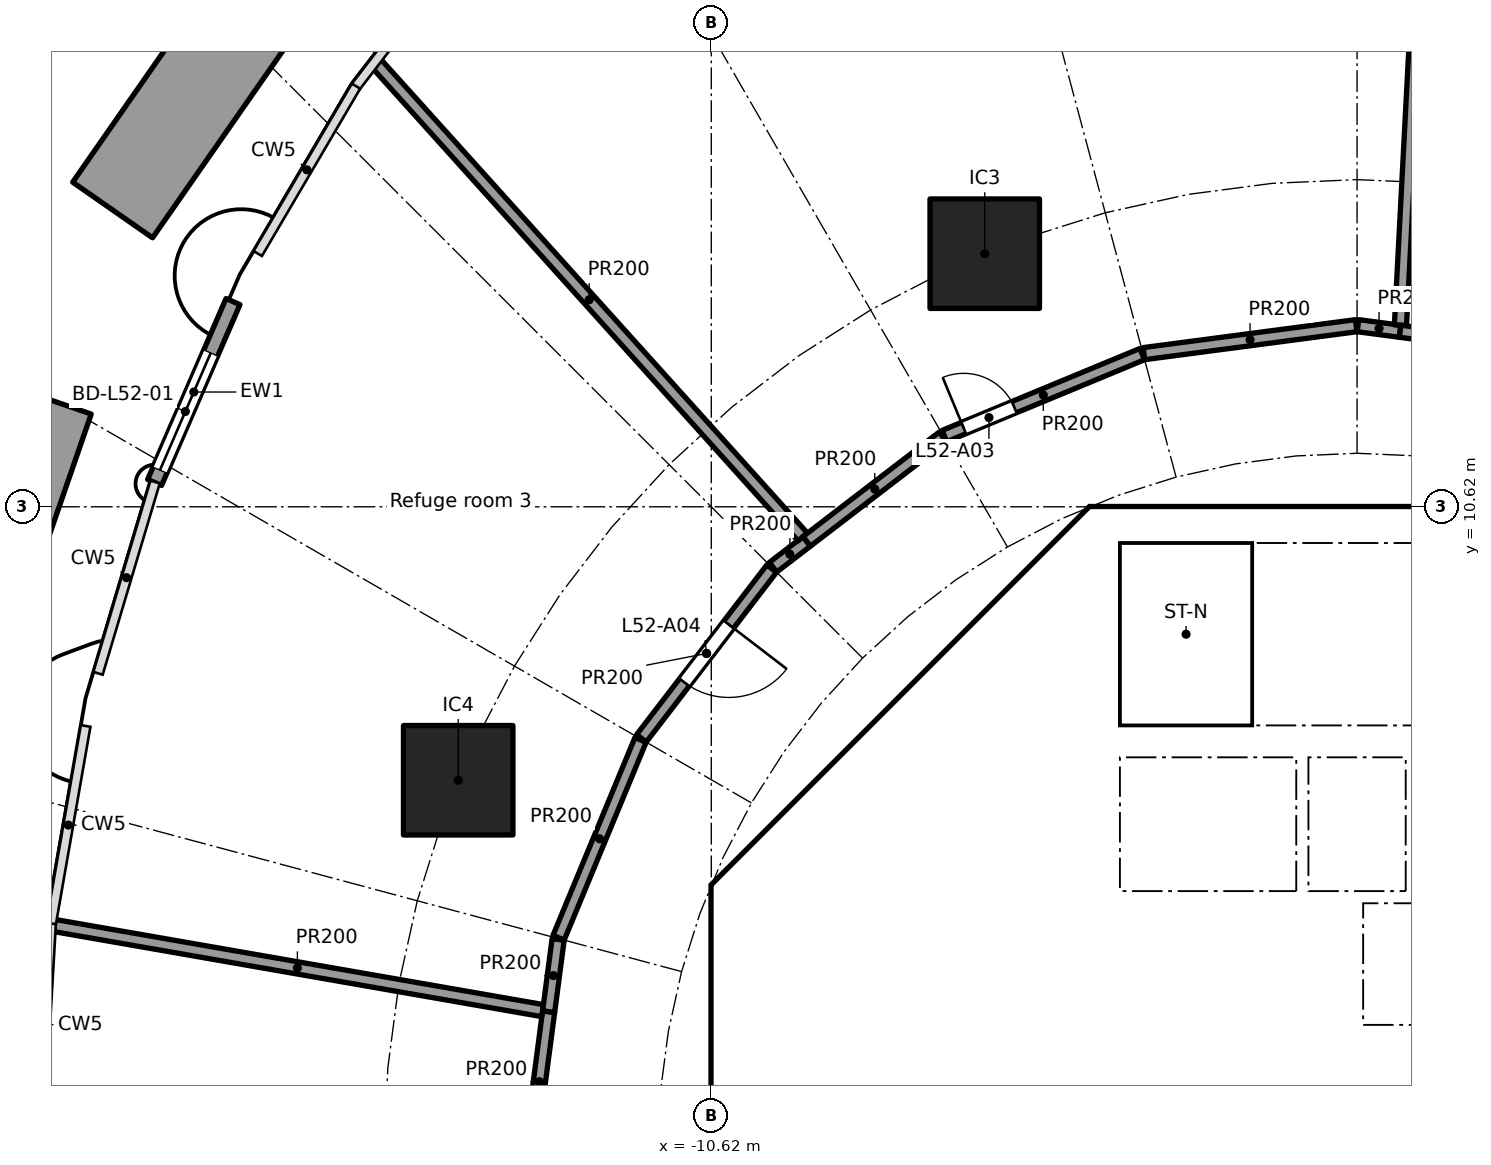
"""IFC4 building model, lengths in metres.
Left out: names, types, materials, properties, quantities, classifications, styles, units other than length and angle.
Written with IfcOpenShell. Run it as: python <this file> out.ifc"""

import sys

from ifc_helpers import new_model, si_unit, direction, frame, frame_2d, origin, origin_2d, place, context, subcontext, project, spatial, polyline, rectangle, outline, extrude, element, fill, save


model = new_model("IFC4")
c1 = context("Model", 3, precision=1e-05, world=origin(), true_north=direction((0.0, 1.0)))
c2 = subcontext(c1, "Body", "Model", "MODEL_VIEW")
j1 = project(units=[si_unit("LENGTHUNIT", "METRE"), si_unit("PLANEANGLEUNIT", "RADIAN")], contexts=[c1])
p1 = place(None, origin())
s1 = spatial("IfcSite", under=j1, at=p1, CompositionType="ELEMENT")
p2 = place(p1, origin())
s2 = spatial("IfcBuilding", under=s1, at=p2, CompositionType="ELEMENT")
p3 = place(p2, frame((0.0, 0.0, 206.6)))
s3 = spatial("IfcBuildingStorey", under=s2, at=p3, CompositionType="ELEMENT", Elevation=206.6)
for number, where, z_axis, x_axis in (
    (1, (-6.123, 14.782, 0.0), (0.0, 0.0, 1.0), (1.0, 0.0, 0.0)),
    (2, (-14.782, 6.123, 0.0), (0.0, 0.0, 1.0), (1.0, 0.0, 0.0)),
):
    element("IfcColumn", number, at=place(p3, frame(where, z_axis=z_axis, x_axis=x_axis)), inside=s3, PredefinedType="COLUMN", context=c2, shape_type="SweptSolid", body=[
        extrude(rectangle(XDim=1.8, YDim=1.8, at=origin_2d()), origin(), (0.0, 0.0, 1.0), 5.6),
    ])
p4 = place(p3, frame((-19.775, 11.02, 0.0), z_axis=(0.0, 0.0, 1.0), x_axis=(0.397624344801, 0.917548298686, 0.0)))
e3 = element("IfcWall", 3, at=p4, inside=s3, PredefinedType="SOLIDWALL", context=c2, shape_type="SweptSolid", body=[
    extrude(rectangle(XDim=3.242, YDim=0.25, at=frame_2d((1.621, 0.0))), origin(), (0.0, 0.0, 1.0), 5.34),
])
p5 = place(p4, frame((0.221, 0.0, 0.0)))
e4 = element("IfcOpeningElement", 4, at=p5, cuts=e3, PredefinedType="OPENING", context=c2, shape_type="SweptSolid", body=[
    extrude(rectangle(XDim=2.1, YDim=2.4, at=frame_2d((1.05, 1.2))), frame((0.0, 0.135, 0.0), z_axis=(0.0, -1.0, 0.0), x_axis=(1.0, 0.0, 0.0)), (0.0, 0.0, 1.0), 0.27),
])
p6 = place(p3, frame((-21.573, 12.406, 0.0), z_axis=(0.0, 0.0, 1.0), x_axis=(-0.326881429712, -0.94506535801, 0.0)))
e5 = element("IfcWall", 5, at=p6, inside=s3, PredefinedType="SOLIDWALL", context=c2, shape_type="SweptSolid", body=[
    extrude(rectangle(XDim=5.05, YDim=1.6, at=frame_2d((2.525, 0.0))), origin(), (0.0, 0.0, 1.0), 1.1),
])
p7 = place(p3, frame((-15.788, 22.215, 0.0), z_axis=(0.0, 0.0, 1.0), x_axis=(-0.571584522967, -0.82054319393, 0.0)))
e6 = element("IfcWall", 6, at=p7, inside=s3, PredefinedType="SOLIDWALL", context=c2, shape_type="SweptSolid", body=[
    extrude(rectangle(XDim=8.183, YDim=1.6, at=frame_2d((4.091, 0.0))), origin(), (0.0, 0.0, 1.0), 1.1),
])
p8 = place(p3, frame((-4.613, 9.988, 0.0), z_axis=(0.0, 0.0, 1.0), x_axis=(-0.707106781187, -0.707106781187, 0.0)))
e7 = element("IfcWall", 7, at=p8, inside=s3, PredefinedType="SHEAR", context=c2, shape_type="SweptSolid", body=[
    extrude(rectangle(XDim=7.602, YDim=0.6, at=frame_2d((3.801, 0.0))), origin(), (0.0, 0.0, 1.0), 5.34),
])
p9 = place(p8, frame((0.351, 0.0, 0.0)))
e8 = element("IfcOpeningElement", 8, at=p9, cuts=e7, PredefinedType="OPENING", context=c2, shape_type="SweptSolid", body=[
    extrude(rectangle(XDim=1.1, YDim=2.1, at=frame_2d((0.55, 1.05))), frame((0.0, 0.31, 0.0), z_axis=(0.0, -1.0, 0.0), x_axis=(1.0, 0.0, 0.0)), (0.0, 0.0, 1.0), 0.62),
])
p10 = place(p3, frame((-10.325, 3.801, 0.0), z_axis=(0.0, 0.0, 1.0), x_axis=(0.0, -1.0, 0.0)))
e9 = element("IfcWall", 9, at=p10, inside=s3, PredefinedType="SHEAR", context=c2, shape_type="SweptSolid", body=[
    extrude(rectangle(XDim=7.602, YDim=0.6, at=frame_2d((3.801, 0.0))), origin(), (0.0, 0.0, 1.0), 5.34),
])
p11 = place(p10, frame((0.651, 0.0, 0.0)))
e10 = element("IfcOpeningElement", 10, at=p11, cuts=e9, PredefinedType="OPENING", context=c2, shape_type="SweptSolid", body=[
    extrude(rectangle(XDim=1.5, YDim=2.1, at=frame_2d((0.75, 1.05))), frame((0.0, 0.31, 0.0), z_axis=(0.0, -1.0, 0.0), x_axis=(1.0, 0.0, 0.0)), (0.0, 0.0, 1.0), 0.62),
])
p12 = place(p10, frame((5.451, 0.0, 0.0)))
e11 = element("IfcOpeningElement", 11, at=p12, cuts=e9, PredefinedType="OPENING", context=c2, shape_type="SweptSolid", body=[
    extrude(rectangle(XDim=1.5, YDim=2.1, at=frame_2d((0.75, 1.05))), frame((0.0, 0.31, 0.0), z_axis=(0.0, -1.0, 0.0), x_axis=(1.0, 0.0, 0.0)), (0.0, 0.0, 1.0), 0.62),
])
p13 = place(p3, frame((-5.8, 4.3, 0.0), z_axis=(0.0, 0.0, 1.0), x_axis=(0.0, 1.0, 0.0)))
e12 = element("IfcWall", 12, at=p13, inside=s3, PredefinedType="PARTITIONING", context=c2, shape_type="SweptSolid", body=[
    extrude(rectangle(XDim=3.927, YDim=0.15, at=frame_2d((1.963, 0.0))), origin(), (0.0, 0.0, 1.0), 5.34),
])
p14 = place(p13, frame((1.551, 0.0, 0.0)))
e13 = element("IfcOpeningElement", 13, at=p14, cuts=e12, PredefinedType="OPENING", context=c2, shape_type="SweptSolid", body=[
    extrude(rectangle(XDim=0.9, YDim=2.1, at=frame_2d((0.45, 1.05))), frame((0.0, 0.085, 0.0), z_axis=(0.0, -1.0, 0.0), x_axis=(1.0, 0.0, 0.0)), (0.0, 0.0, 1.0), 0.17),
])
p15 = place(p3, frame((-4.0, 4.3, 0.0), z_axis=(0.0, 0.0, 1.0), x_axis=(0.0, 1.0, 0.0)))
e14 = element("IfcWall", 14, at=p15, inside=s3, PredefinedType="SOLIDWALL", context=c2, shape_type="SweptSolid", body=[
    extrude(rectangle(XDim=2.2, YDim=0.2, at=frame_2d((1.1, 0.0))), origin(), (0.0, 0.0, 1.0), 5.34),
])
p16 = place(p15, frame((0.55, 0.0, 0.0)))
e15 = element("IfcOpeningElement", 15, at=p16, cuts=e14, PredefinedType="OPENING", context=c2, shape_type="SweptSolid", body=[
    extrude(rectangle(XDim=1.1, YDim=2.1, at=frame_2d((0.55, 1.05))), frame((0.0, 0.11, 0.0), z_axis=(0.0, -1.0, 0.0), x_axis=(1.0, 0.0, 0.0)), (0.0, 0.0, 1.0), 0.22),
])
p17 = place(p3, frame((-6.7, 2.0, 0.0), z_axis=(0.0, 0.0, 1.0), x_axis=(1.0, 0.0, 0.0)))
e16 = element("IfcWall", 16, at=p17, inside=s3, PredefinedType="SOLIDWALL", context=c2, shape_type="SweptSolid", body=[
    extrude(rectangle(XDim=13.4, YDim=0.2, at=frame_2d((6.7, 0.0))), origin(), (0.0, 0.0, 1.0), 5.34),
])
p18 = place(p17, frame((7.25, 0.0, 0.0)))
e17 = element("IfcOpeningElement", 17, at=p18, cuts=e16, PredefinedType="OPENING", context=c2, shape_type="SweptSolid", body=[
    extrude(rectangle(XDim=1.1, YDim=2.1, at=frame_2d((0.55, 1.05))), frame((0.0, 0.11, 0.0), z_axis=(0.0, -1.0, 0.0), x_axis=(1.0, 0.0, 0.0)), (0.0, 0.0, 1.0), 0.22),
])
p19 = place(p17, frame((9.45, 0.0, 0.0)))
e18 = element("IfcOpeningElement", 18, at=p19, cuts=e16, PredefinedType="OPENING", context=c2, shape_type="SweptSolid", body=[
    extrude(rectangle(XDim=1.1, YDim=2.1, at=frame_2d((0.55, 1.05))), frame((0.0, 0.11, 0.0), z_axis=(0.0, -1.0, 0.0), x_axis=(1.0, 0.0, 0.0)), (0.0, 0.0, 1.0), 0.22),
])
p20 = place(p17, frame((0.75, 0.0, 0.0)))
e19 = element("IfcOpeningElement", 19, at=p20, cuts=e16, PredefinedType="OPENING", context=c2, shape_type="SweptSolid", body=[
    extrude(rectangle(XDim=0.9, YDim=2.1, at=frame_2d((0.45, 1.05))), frame((0.0, 0.11, 0.0), z_axis=(0.0, -1.0, 0.0), x_axis=(1.0, 0.0, 0.0)), (0.0, 0.0, 1.0), 0.22),
])
p21 = place(p17, frame((4.05, 0.0, 0.0)))
e20 = element("IfcOpeningElement", 20, at=p21, cuts=e16, PredefinedType="OPENING", context=c2, shape_type="SweptSolid", body=[
    extrude(rectangle(XDim=0.9, YDim=2.1, at=frame_2d((0.45, 1.05))), frame((0.0, 0.11, 0.0), z_axis=(0.0, -1.0, 0.0), x_axis=(1.0, 0.0, 0.0)), (0.0, 0.0, 1.0), 0.22),
])
p22 = place(p3, origin())
e21 = element("IfcWall", 21, at=p22, inside=s3, PredefinedType="SHEAR", context=c2, shape_type="SweptSolid", body=[
    extrude(outline(polyline([(-10.2, 4.825), (-9.776, 4.401), (-10.025, 4.152), (-10.025, 3.801), (-10.625, 3.801), (-10.625, 4.401), (-10.2, 4.825)])), origin(), (0.0, 0.0, 1.0), 5.34),
])
p23 = place(p3, origin())
e22 = element("IfcWall", 22, at=p23, inside=s3, PredefinedType="SHEAR", context=c2, shape_type="SweptSolid", body=[
    extrude(outline(polyline([(-4.152, 10.025), (-4.401, 9.776), (-4.825, 10.2), (-4.401, 10.625), (4.401, 10.625), (4.825, 10.2), (4.401, 9.776), (4.152, 10.025), (-4.152, 10.025)])), origin(), (0.0, 0.0, 1.0), 5.34),
])
for number, where, z_axis, x_axis in (
    (23, (-0.9, 4.3, 0.0), (0.0, 0.0, 1.0), (0.0, 1.0, 0.0)),
    (24, (0.9, 4.3, 0.0), (0.0, 0.0, 1.0), (0.0, 1.0, 0.0)),
):
    element("IfcWall", number, at=place(p3, frame(where, z_axis=z_axis, x_axis=x_axis)), inside=s3, PredefinedType="SOLIDWALL", context=c2, shape_type="SweptSolid", body=[
        extrude(rectangle(XDim=2.2, YDim=0.2, at=frame_2d((1.1, 0.0))), origin(), (0.0, 0.0, 1.0), 5.34),
    ])
p24 = place(p3, origin())
e25 = element("IfcWall", 25, at=p24, inside=s3, PredefinedType="SOLIDWALL", context=c2, shape_type="SweptSolid", body=[
    extrude(outline(polyline([(-6.7, 4.3), (6.7, 4.3), (6.7, 2.1), (6.5, 2.1), (6.5, 4.1), (4.5, 4.1), (4.5, 2.1), (4.3, 2.1), (4.3, 4.1), (2.3, 4.1), (2.3, 2.1), (2.1, 2.1), (2.1, 4.1), (0.1, 4.1), (0.1, 2.1), (-0.1, 2.1), (-0.1, 4.1), (-4.3, 4.1), (-4.3, 2.1), (-4.5, 2.1), (-4.5, 4.1), (-6.5, 4.1), (-6.5, 2.1), (-6.7, 2.1), (-6.7, 4.3)])), origin(), (0.0, 0.0, 1.0), 5.34),
])
p25 = place(p3, frame((-10.025, 4.0, 0.0), z_axis=(0.0, 0.0, 1.0), x_axis=(1.0, 0.0, 0.0)))
e26 = element("IfcWall", 26, at=p25, inside=s3, PredefinedType="PARTITIONING", context=c2, shape_type="SweptSolid", body=[
    extrude(rectangle(XDim=3.325, YDim=0.2, at=frame_2d((1.662, 0.0))), origin(), (0.0, 0.0, 1.0), 5.34),
])
p26 = place(p3, origin())
e27 = element("IfcWall", 27, at=p26, inside=s3, PredefinedType="SOLIDWALL", context=c2, shape_type="SweptSolid", body=[
    extrude(outline(polyline([(-3.9, 7.025), (-4.1, 7.025), (-4.1, 10.025), (-3.9, 10.025), (-3.9, 7.025)])), origin(), (0.0, 0.0, 1.0), 5.34),
])
p27 = place(p3, origin())
e28 = element("IfcWall", 28, at=p27, inside=s3, PredefinedType="SOLIDWALL", context=c2, shape_type="SweptSolid", body=[
    extrude(outline(polyline([(4.1, 6.5), (-4.1, 6.5), (-4.1, 7.025), (4.1, 7.025), (4.1, 6.5)])), origin(), (0.0, 0.0, 1.0), 5.34),
])
p28 = place(p3, frame((-13.598, 0.015, 0.0), z_axis=(0.0, 0.0, 1.0), x_axis=(0.130476270168, 0.991451432458, 0.0)))
e29 = element("IfcWall", 29, at=p28, inside=s3, PredefinedType="PARTITIONING", context=c2, shape_type="SweptSolid", body=[
    extrude(rectangle(XDim=2.322, YDim=0.2, at=frame_2d((1.161, 0.0))), origin(), (0.0, 0.0, 1.0), 5.34),
])
p29 = place(p3, frame((-13.394, 2.334, 0.0), z_axis=(0.0, 0.0, 1.0), x_axis=(-0.985144930299, 0.171724972867, 0.0)))
e30 = element("IfcWall", 30, at=p29, inside=s3, PredefinedType="PARTITIONING", context=c2, shape_type="SweptSolid", body=[
    extrude(rectangle(XDim=8.188, YDim=0.2, at=frame_2d((4.094, 0.0))), origin(), (0.0, 0.0, 1.0), 5.34),
])
p30 = place(p3, frame((-13.295, 2.317, 0.0), z_axis=(0.0, 0.0, 1.0), x_axis=(0.130454512571, 0.991454295543, 0.0)))
e31 = element("IfcWall", 31, at=p30, inside=s3, PredefinedType="PARTITIONING", context=c2, shape_type="SweptSolid", body=[
    extrude(rectangle(XDim=1.198, YDim=0.2, at=frame_2d((0.599, 0.0))), origin(), (0.0, 0.0, 1.0), 5.34),
])
p31 = place(p3, frame((-13.131, 3.534, 0.0), z_axis=(0.0, 0.0, 1.0), x_axis=(0.382723413813, 0.92386297064, 0.0)))
e32 = element("IfcWall", 32, at=p31, inside=s3, PredefinedType="PARTITIONING", context=c2, shape_type="SweptSolid", body=[
    extrude(rectangle(XDim=3.52, YDim=0.2, at=frame_2d((1.76, 0.0))), origin(), (0.0, 0.0, 1.0), 5.34),
])
p32 = place(p3, frame((-11.769, 6.812, 0.0), z_axis=(0.0, 0.0, 1.0), x_axis=(0.608697977542, 0.793402024283, 0.0)))
e33 = element("IfcWall", 33, at=p32, inside=s3, PredefinedType="PARTITIONING", context=c2, shape_type="SweptSolid", body=[
    extrude(rectangle(XDim=3.52, YDim=0.2, at=frame_2d((1.76, 0.0))), origin(), (0.0, 0.0, 1.0), 5.34),
])
p33 = place(p32, frame((1.16, 0.0, 0.0)))
e34 = element("IfcOpeningElement", 34, at=p33, cuts=e33, PredefinedType="OPENING", context=c2, shape_type="SweptSolid", body=[
    extrude(rectangle(XDim=1.2, YDim=2.1, at=frame_2d((0.6, 1.05))), frame((0.0, 0.11, 0.0), z_axis=(0.0, -1.0, 0.0), x_axis=(1.0, 0.0, 0.0)), (0.0, 0.0, 1.0), 0.22),
])
p34 = place(p3, frame((-9.605, 9.626, 0.0), z_axis=(0.0, 0.0, 1.0), x_axis=(0.793454504248, 0.608629566887, 0.0)))
e35 = element("IfcWall", 35, at=p34, inside=s3, PredefinedType="PARTITIONING", context=c2, shape_type="SweptSolid", body=[
    extrude(rectangle(XDim=0.699, YDim=0.2, at=frame_2d((0.349, 0.0))), origin(), (0.0, 0.0, 1.0), 5.34),
])
p35 = place(p3, frame((-9.117, 10.126, 0.0), z_axis=(0.0, 0.0, 1.0), x_axis=(-0.66912025522, 0.743154145554, 0.0)))
e36 = element("IfcWall", 36, at=p35, inside=s3, PredefinedType="PARTITIONING", context=c2, shape_type="SweptSolid", body=[
    extrude(rectangle(XDim=10.493, YDim=0.2, at=frame_2d((5.247, 0.0))), origin(), (0.0, 0.0, 1.0), 5.34),
])
p36 = place(p3, frame((-9.05, 10.051, 0.0), z_axis=(0.0, 0.0, 1.0), x_axis=(0.793389024662, 0.608714921409, 0.0)))
e37 = element("IfcWall", 37, at=p36, inside=s3, PredefinedType="PARTITIONING", context=c2, shape_type="SweptSolid", body=[
    extrude(rectangle(XDim=2.821, YDim=0.2, at=frame_2d((1.411, 0.0))), origin(), (0.0, 0.0, 1.0), 5.34),
])
p37 = place(p3, frame((-6.786, 11.784, 0.0), z_axis=(0.0, 0.0, 1.0), x_axis=(0.92386297064, 0.382723413813, 0.0)))
e38 = element("IfcWall", 38, at=p37, inside=s3, PredefinedType="PARTITIONING", context=c2, shape_type="SweptSolid", body=[
    extrude(rectangle(XDim=3.52, YDim=0.2, at=frame_2d((1.76, 0.0))), origin(), (0.0, 0.0, 1.0), 5.34),
])
p38 = place(p37, frame((0.342, 0.0, 0.0)))
e39 = element("IfcOpeningElement", 39, at=p38, cuts=e38, PredefinedType="OPENING", context=c2, shape_type="SweptSolid", body=[
    extrude(rectangle(XDim=0.9, YDim=2.1, at=frame_2d((0.45, 1.05))), frame((0.0, 0.11, 0.0), z_axis=(0.0, -1.0, 0.0), x_axis=(1.0, 0.0, 0.0)), (0.0, 0.0, 1.0), 0.22),
])
p39 = place(p3, frame((-3.505, 13.139, 0.0), z_axis=(0.0, 0.0, 1.0), x_axis=(0.991452406768, 0.130468866457, 0.0)))
e40 = element("IfcWall", 40, at=p39, inside=s3, PredefinedType="PARTITIONING", context=c2, shape_type="SweptSolid", body=[
    extrude(rectangle(XDim=3.52, YDim=0.2, at=frame_2d((1.76, 0.0))), origin(), (0.0, 0.0, 1.0), 5.34),
])
p40 = place(p3, frame((0.015, 13.598, 0.0), z_axis=(0.0, 0.0, 1.0), x_axis=(0.991473310532, -0.130309917135, 0.0)))
e41 = element("IfcWall", 41, at=p40, inside=s3, PredefinedType="PARTITIONING", context=c2, shape_type="SweptSolid", body=[
    extrude(rectangle(XDim=0.699, YDim=0.2, at=frame_2d((0.349, 0.0))), origin(), (0.0, 0.0, 1.0), 5.34),
])
p41 = place(p3, frame((0.713, 13.607, 0.0), z_axis=(0.0, 0.0, 1.0), x_axis=(0.052330372828, 0.998629827353, 0.0)))
e42 = element("IfcWall", 42, at=p41, inside=s3, PredefinedType="PARTITIONING", context=c2, shape_type="SweptSolid", body=[
    extrude(rectangle(XDim=15.032, YDim=0.2, at=frame_2d((7.516, 0.0))), origin(), (0.0, 0.0, 1.0), 5.34),
])
p42 = place(p3, frame((0.708, 13.507, 0.0), z_axis=(0.0, 0.0, 1.0), x_axis=(0.991447224467, -0.130508241489, 0.0)))
e43 = element("IfcWall", 43, at=p42, inside=s3, PredefinedType="PARTITIONING", context=c2, shape_type="SweptSolid", body=[
    extrude(rectangle(XDim=2.821, YDim=0.2, at=frame_2d((1.411, 0.0))), origin(), (0.0, 0.0, 1.0), 5.34),
])
p43 = place(p5, origin())
e44 = element("IfcDoor", 44, at=p43, inside=s3, OperationType="SLIDING_TO_LEFT", PredefinedType="DOOR", context=c2, shape_type="SweptSolid", body=[
    extrude(rectangle(XDim=2.1, YDim=2.4, at=frame_2d((1.05, 1.2))), frame((0.0, 0.025, 0.0), z_axis=(0.0, -1.0, 0.0), x_axis=(1.0, 0.0, 0.0)), (0.0, 0.0, 1.0), 0.05),
])
fill(e4, e44)
p44 = place(p18, origin())
e45 = element("IfcDoor", 45, at=p44, inside=s3, OperationType="DOUBLE_DOOR_SLIDING", PredefinedType="DOOR", context=c2, shape_type="SweptSolid", body=[
    extrude(rectangle(XDim=1.1, YDim=2.1, at=frame_2d((0.55, 1.05))), frame((0.0, 0.025, 0.0), z_axis=(0.0, -1.0, 0.0), x_axis=(1.0, 0.0, 0.0)), (0.0, 0.0, 1.0), 0.05),
])
fill(e17, e45)
p45 = place(p16, origin())
e46 = element("IfcDoor", 46, at=p45, inside=s3, OperationType="DOUBLE_DOOR_SLIDING", PredefinedType="DOOR", context=c2, shape_type="SweptSolid", body=[
    extrude(rectangle(XDim=1.1, YDim=2.1, at=frame_2d((0.55, 1.05))), frame((0.0, 0.025, 0.0), z_axis=(0.0, -1.0, 0.0), x_axis=(1.0, 0.0, 0.0)), (0.0, 0.0, 1.0), 0.05),
])
fill(e15, e46)
p46 = place(p14, origin())
e47 = element("IfcDoor", 47, at=p46, inside=s3, OperationType="SINGLE_SWING_RIGHT", PredefinedType="DOOR", context=c2, shape_type="SweptSolid", body=[
    extrude(rectangle(XDim=0.9, YDim=2.1, at=frame_2d((0.45, 1.05))), frame((0.0, 0.025, 0.0), z_axis=(0.0, -1.0, 0.0), x_axis=(1.0, 0.0, 0.0)), (0.0, 0.0, 1.0), 0.05),
])
fill(e13, e47)
p47 = place(p20, origin())
e48 = element("IfcDoor", 48, at=p47, inside=s3, OperationType="SINGLE_SWING_LEFT", PredefinedType="DOOR", context=c2, shape_type="SweptSolid", body=[
    extrude(rectangle(XDim=0.9, YDim=2.1, at=frame_2d((0.45, 1.05))), frame((0.0, 0.025, 0.0), z_axis=(0.0, -1.0, 0.0), x_axis=(1.0, 0.0, 0.0)), (0.0, 0.0, 1.0), 0.05),
])
fill(e19, e48)
p48 = place(p21, origin())
e49 = element("IfcDoor", 49, at=p48, inside=s3, OperationType="SINGLE_SWING_LEFT", PredefinedType="DOOR", context=c2, shape_type="SweptSolid", body=[
    extrude(rectangle(XDim=0.9, YDim=2.1, at=frame_2d((0.45, 1.05))), frame((0.0, 0.025, 0.0), z_axis=(0.0, -1.0, 0.0), x_axis=(1.0, 0.0, 0.0)), (0.0, 0.0, 1.0), 0.05),
])
fill(e20, e49)
p49 = place(p11, origin())
e50 = element("IfcDoor", 50, at=p49, inside=s3, OperationType="DOUBLE_DOOR_SINGLE_SWING", PredefinedType="DOOR", context=c2, shape_type="SweptSolid", body=[
    extrude(rectangle(XDim=1.5, YDim=2.1, at=frame_2d((0.75, 1.05))), frame((0.0, 0.025, 0.0), z_axis=(0.0, -1.0, 0.0), x_axis=(1.0, 0.0, 0.0)), (0.0, 0.0, 1.0), 0.05),
])
fill(e10, e50)
p50 = place(p9, origin())
e51 = element("IfcDoor", 51, at=p50, inside=s3, OperationType="SINGLE_SWING_LEFT", PredefinedType="DOOR", context=c2, shape_type="SweptSolid", body=[
    extrude(rectangle(XDim=1.1, YDim=2.1, at=frame_2d((0.55, 1.05))), frame((0.0, 0.025, 0.0), z_axis=(0.0, -1.0, 0.0), x_axis=(1.0, 0.0, 0.0)), (0.0, 0.0, 1.0), 0.05),
])
fill(e8, e51)
p51 = place(p38, origin())
e52 = element("IfcDoor", 52, at=p51, inside=s3, OperationType="SINGLE_SWING_LEFT", PredefinedType="DOOR", context=c2, shape_type="SweptSolid", body=[
    extrude(rectangle(XDim=0.9, YDim=2.1, at=frame_2d((0.45, 1.05))), frame((0.0, 0.025, 0.0), z_axis=(0.0, -1.0, 0.0), x_axis=(1.0, 0.0, 0.0)), (0.0, 0.0, 1.0), 0.05),
])
fill(e39, e52)
p52 = place(p33, frame((1.2, 0.0, 0.0), x_axis=(-1.0, 0.0, 0.0)))
e53 = element("IfcDoor", 53, at=p52, inside=s3, OperationType="SINGLE_SWING_LEFT", PredefinedType="DOOR", context=c2, shape_type="SweptSolid", body=[
    extrude(rectangle(XDim=1.2, YDim=2.1, at=frame_2d((0.6, 1.05))), frame((0.0, 0.025, 0.0), z_axis=(0.0, -1.0, 0.0), x_axis=(1.0, 0.0, 0.0)), (0.0, 0.0, 1.0), 0.05),
])
fill(e34, e53)
save(model, sys.argv[1])
